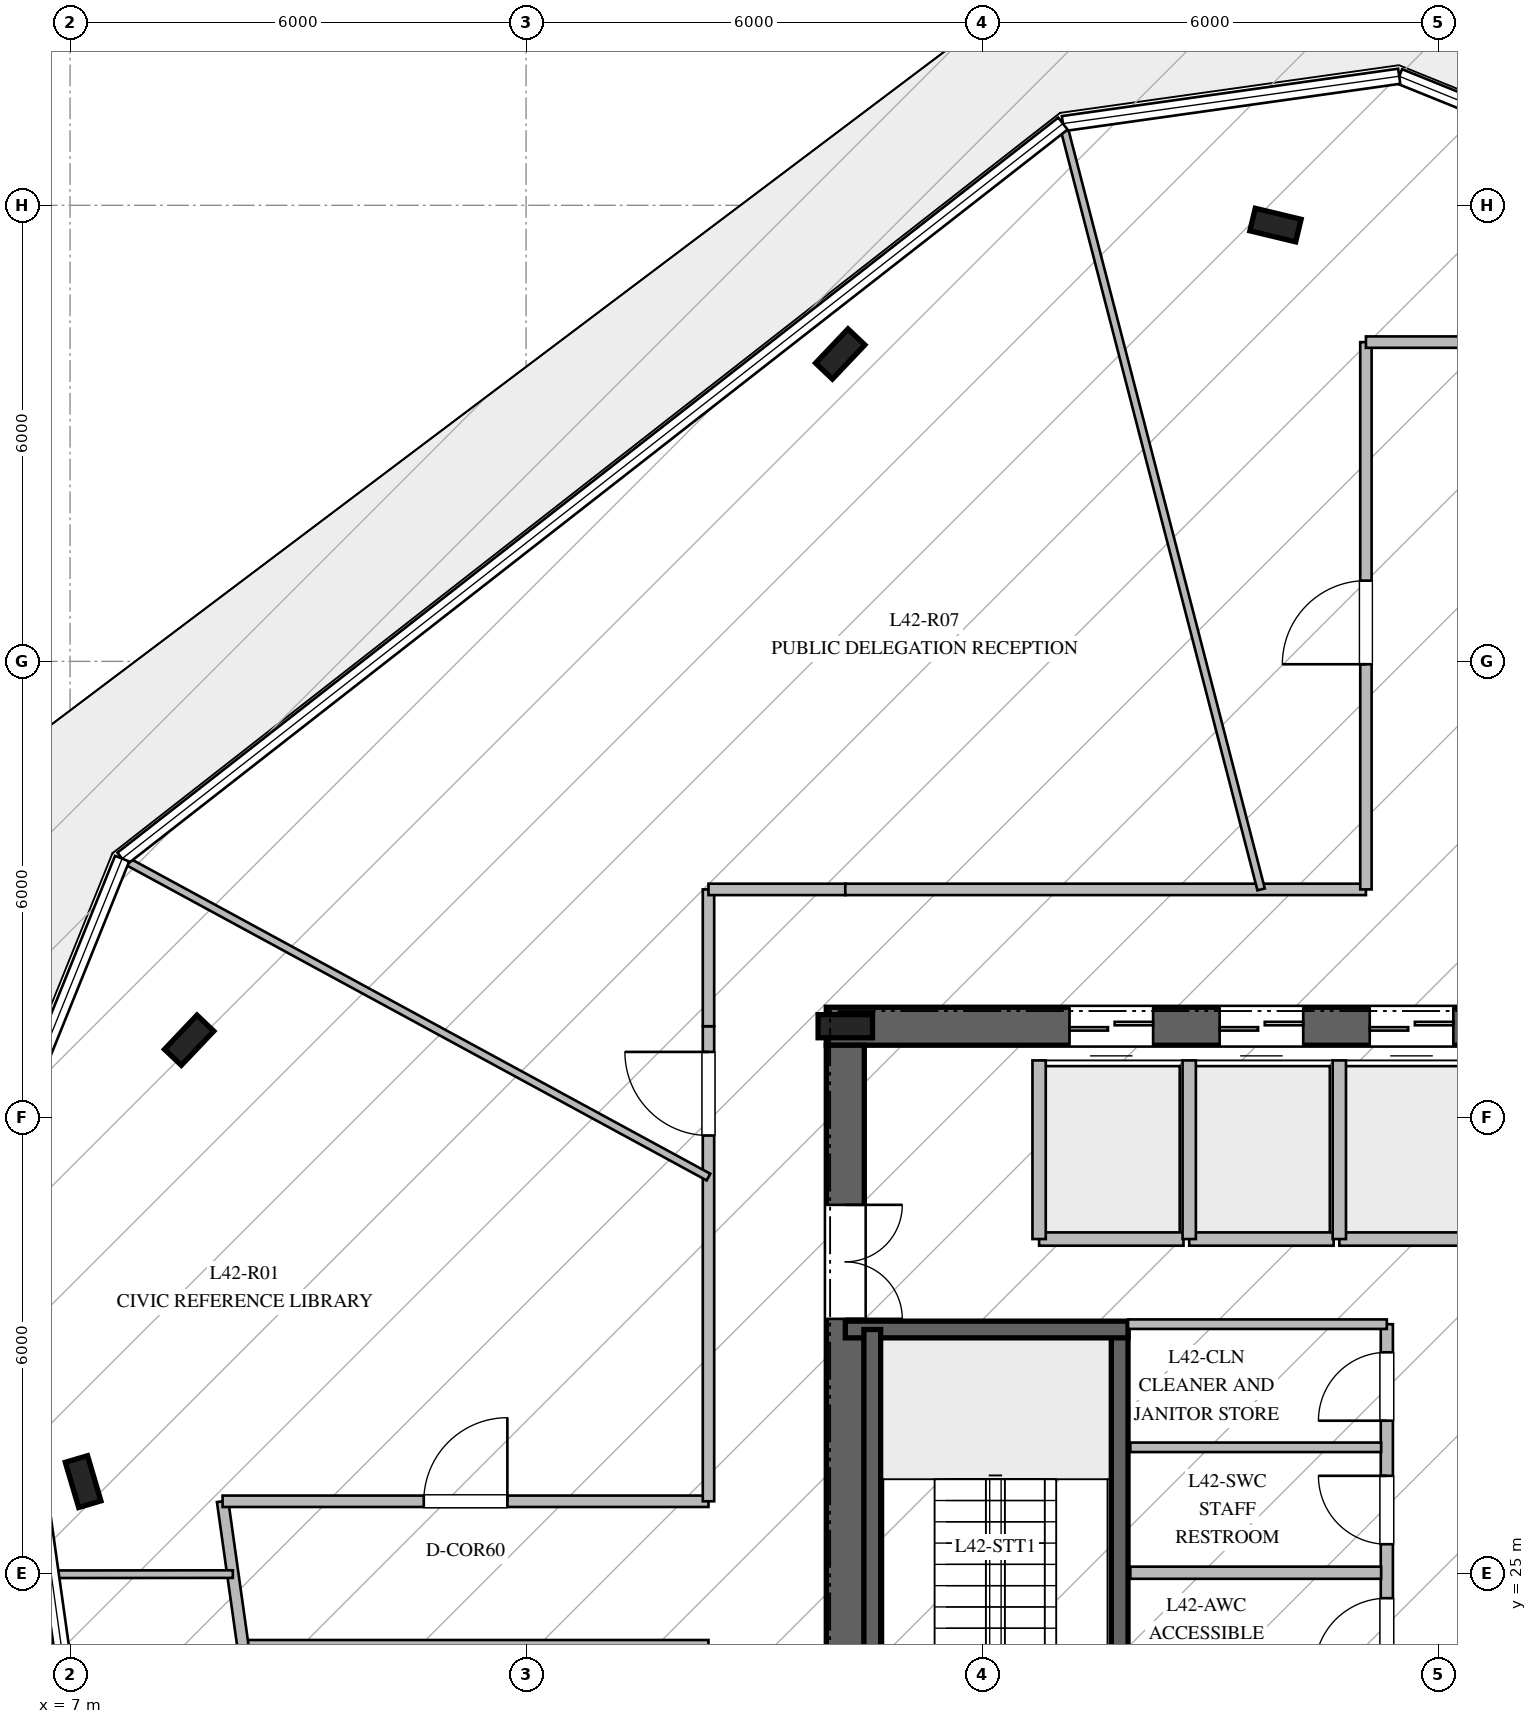
"""IFC4 building model, lengths in metres.
Left out: names, types, materials, properties, quantities, classifications, styles, units other than length and angle.
Written with IfcOpenShell. Run it as: python <this file> out.ifc"""

import sys

from ifc_helpers import new_model, si_unit, direction, frame, frame_2d, origin, origin_2d, place, context, subcontext, project, spatial, rectangle, i_section, extrude, element, fill, save


model = new_model("IFC4")
c1 = context("Model", 3, precision=1e-05, world=origin(), true_north=direction((0.0, 1.0)))
c2 = subcontext(c1, "Body", "Model", "MODEL_VIEW")
j1 = project(units=[si_unit("LENGTHUNIT", "METRE"), si_unit("PLANEANGLEUNIT", "RADIAN")], contexts=[c1])
p1 = place(None, origin())
s1 = spatial("IfcSite", under=j1, at=p1, CompositionType="ELEMENT")
p2 = place(p1, origin())
s2 = spatial("IfcBuilding", under=s1, at=p2, CompositionType="ELEMENT")
p3 = place(p2, frame((0.0, 0.0, 175.8)))
s3 = spatial("IfcBuildingStorey", under=s2, at=p3, CompositionType="ELEMENT", Elevation=175.8)
p4 = place(p3, frame((33.05, 32.2, 0.0), z_axis=(0.0, 0.0, 1.0), x_axis=(-1.0, 0.0, 0.0)))
e1 = element("IfcWall", 1, at=p4, inside=s3, PredefinedType="SHEAR", context=c2, shape_type="SweptSolid", body=[
    extrude(rectangle(XDim=16.1, YDim=0.5, at=frame_2d((8.05, 0.0))), origin(), (0.0, 0.0, 1.0), 4.78),
])
p5 = place(p4, frame((5.0, 0.0, 0.0)))
e2 = element("IfcOpeningElement", 2, at=p5, cuts=e1, PredefinedType="OPENING", context=c2, shape_type="SweptSolid", body=[
    extrude(rectangle(XDim=1.2, YDim=2.25, at=frame_2d((0.6, 1.125))), frame((0.0, 0.26, 0.0), z_axis=(0.0, -1.0, 0.0), x_axis=(1.0, 0.0, 0.0)), (0.0, 0.0, 1.0), 0.52),
])
p6 = place(p4, frame((11.8, 0.0, 0.0)))
e3 = element("IfcOpeningElement", 3, at=p6, cuts=e1, PredefinedType="OPENING", context=c2, shape_type="SweptSolid", body=[
    extrude(rectangle(XDim=1.1, YDim=2.2, at=frame_2d((0.55, 1.1))), frame((0.0, 0.26, 0.0), z_axis=(0.0, -1.0, 0.0), x_axis=(1.0, 0.0, 0.0)), (0.0, 0.0, 1.0), 0.52),
])
p7 = place(p4, frame((9.825, 0.0, 0.0)))
e4 = element("IfcOpeningElement", 4, at=p7, cuts=e1, PredefinedType="OPENING", context=c2, shape_type="SweptSolid", body=[
    extrude(rectangle(XDim=1.1, YDim=2.2, at=frame_2d((0.55, 1.1))), frame((0.0, 0.26, 0.0), z_axis=(0.0, -1.0, 0.0), x_axis=(1.0, 0.0, 0.0)), (0.0, 0.0, 1.0), 0.52),
])
p8 = place(p4, frame((7.85, 0.0, 0.0)))
e5 = element("IfcOpeningElement", 5, at=p8, cuts=e1, PredefinedType="OPENING", context=c2, shape_type="SweptSolid", body=[
    extrude(rectangle(XDim=1.1, YDim=2.2, at=frame_2d((0.55, 1.1))), frame((0.0, 0.26, 0.0), z_axis=(0.0, -1.0, 0.0), x_axis=(1.0, 0.0, 0.0)), (0.0, 0.0, 1.0), 0.52),
])
p9 = place(p3, frame((17.2, 31.95, 0.0), z_axis=(0.0, 0.0, 1.0), x_axis=(0.0, -1.0, 0.0)))
e6 = element("IfcWall", 6, at=p9, inside=s3, PredefinedType="SHEAR", context=c2, shape_type="SweptSolid", body=[
    extrude(rectangle(XDim=13.9, YDim=0.5, at=frame_2d((6.95, 0.0))), origin(), (0.0, 0.0, 1.0), 4.78),
])
p10 = place(p9, frame((2.1, 0.0, 0.0)))
e7 = element("IfcOpeningElement", 7, at=p10, cuts=e6, PredefinedType="OPENING", context=c2, shape_type="SweptSolid", body=[
    extrude(rectangle(XDim=1.5, YDim=2.2, at=frame_2d((0.75, 1.1))), frame((0.0, 0.26, 0.0), z_axis=(0.0, -1.0, 0.0), x_axis=(1.0, 0.0, 0.0)), (0.0, 0.0, 1.0), 0.52),
])
p11 = place(p3, frame((17.2, 32.2, 0.0), z_axis=(0.0, 0.0, 1.0), x_axis=(1.0, 0.0, 0.0)))
e8 = element("IfcColumn", 8, at=p11, inside=s3, PredefinedType="COLUMN", context=c2, shape_type="SweptSolid", body=[
    extrude(i_section(OverallWidth=0.304, OverallDepth=0.716, WebThickness=0.021, FlangeThickness=0.04, at=origin_2d()), origin(), (0.0, 0.0, 1.0), 5.0),
])
p12 = place(p3, frame((20.81, 20.99, 0.0), z_axis=(0.0, 0.0, 1.0), x_axis=(0.0, 1.0, 0.0)))
e9 = element("IfcWall", 9, at=p12, inside=s3, PredefinedType="SOLIDWALL", context=c2, shape_type="SweptSolid", body=[
    extrude(rectangle(XDim=7.22, YDim=0.22, at=frame_2d((3.61, 0.0))), origin(), (0.0, 0.0, 1.0), 4.78),
])
p13 = place(p12, frame((0.18, 0.0, 0.0)))
e10 = element("IfcOpeningElement", 10, at=p13, cuts=e9, PredefinedType="OPENING", context=c2, shape_type="SweptSolid", body=[
    extrude(rectangle(XDim=1.15, YDim=2.2, at=frame_2d((0.575, 1.1))), frame((0.0, 0.12, 0.0), z_axis=(0.0, -1.0, 0.0), x_axis=(1.0, 0.0, 0.0)), (0.0, 0.0, 1.0), 0.24),
])
p14 = place(p3, frame((17.2, 28.21, 0.0), z_axis=(0.0, 0.0, 1.0), x_axis=(1.0, 0.0, 0.0)))
e11 = element("IfcWall", 11, at=p14, inside=s3, PredefinedType="SOLIDWALL", context=c2, shape_type="SweptSolid", body=[
    extrude(rectangle(XDim=3.72, YDim=0.22, at=frame_2d((1.86, 0.0))), origin(), (0.0, 0.0, 1.0), 4.78),
])
p15 = place(p3, frame((17.555, 28.21, 0.0), z_axis=(0.0, 0.0, 1.0), x_axis=(0.0, -1.0, 0.0)))
e12 = element("IfcWall", 12, at=p15, inside=s3, PredefinedType="SOLIDWALL", context=c2, shape_type="SweptSolid", body=[
    extrude(rectangle(XDim=7.22, YDim=0.22, at=frame_2d((3.61, 0.0))), origin(), (0.0, 0.0, 1.0), 4.78),
])
for number, where, z_axis, x_axis in (
    (13, (22.86, 42.74, -0.27), (0.0, 0.0, 1.0), (-0.972, 0.233, 0.0)),
    (14, (17.133, 41.044, -0.27), (0.0, 0.0, 1.0), (0.688, 0.725, 0.0)),
    (15, (8.567, 32.016, -0.27), (0.0, 0.0, 1.0), (0.688, 0.725, 0.0)),
    (16, (7.172, 26.209, -0.27), (0.0, 0.0, 1.0), (-0.284, 0.959, 0.0)),
):
    element("IfcColumn", number, at=place(p3, frame(where, z_axis=z_axis, x_axis=x_axis)), inside=s3, PredefinedType="COLUMN", context=c2, shape_type="SweptSolid", body=[
        extrude(i_section(OverallWidth=0.305, OverallDepth=0.62, WebThickness=0.021, FlangeThickness=0.04, at=origin_2d()), origin(), (0.0, 0.0, 1.0), 5.27),
    ])
p16 = place(p3, frame((24.325, 23.35, 0.0), z_axis=(0.0, 0.0, 1.0), x_axis=(0.0, 1.0, 0.0)))
e17 = element("IfcWall", 17, at=p16, inside=s3, PredefinedType="PLUMBINGWALL", context=c2, shape_type="SweptSolid", body=[
    extrude(rectangle(XDim=4.93, YDim=0.16, at=frame_2d((2.465, 0.0))), origin(), (0.0, 0.0, 1.0), 4.78),
])
p17 = place(p16, frame((0.375, 0.0, 0.0)))
e18 = element("IfcOpeningElement", 18, at=p17, cuts=e17, PredefinedType="OPENING", context=c2, shape_type="SweptSolid", body=[
    extrude(rectangle(XDim=0.95, YDim=2.1, at=frame_2d((0.475, 1.05))), frame((0.0, 0.09, 0.0), z_axis=(0.0, -1.0, 0.0), x_axis=(1.0, 0.0, 0.0)), (0.0, 0.0, 1.0), 0.18),
])
p18 = place(p16, frame((2.035, 0.0, 0.0)))
e19 = element("IfcOpeningElement", 19, at=p18, cuts=e17, PredefinedType="OPENING", context=c2, shape_type="SweptSolid", body=[
    extrude(rectangle(XDim=0.9, YDim=2.1, at=frame_2d((0.45, 1.05))), frame((0.0, 0.09, 0.0), z_axis=(0.0, -1.0, 0.0), x_axis=(1.0, 0.0, 0.0)), (0.0, 0.0, 1.0), 0.18),
])
p19 = place(p16, frame((3.66, 0.0, 0.0)))
e20 = element("IfcOpeningElement", 20, at=p19, cuts=e17, PredefinedType="OPENING", context=c2, shape_type="SweptSolid", body=[
    extrude(rectangle(XDim=0.9, YDim=2.1, at=frame_2d((0.45, 1.05))), frame((0.0, 0.09, 0.0), z_axis=(0.0, -1.0, 0.0), x_axis=(1.0, 0.0, 0.0)), (0.0, 0.0, 1.0), 0.18),
])
p20 = place(p3, frame((20.92, 28.28, 0.0), z_axis=(0.0, 0.0, 1.0), x_axis=(1.0, 0.0, 0.0)))
e21 = element("IfcWall", 21, at=p20, inside=s3, PredefinedType="PARTITIONING", context=c2, shape_type="SweptSolid", body=[
    extrude(rectangle(XDim=3.405, YDim=0.125, at=frame_2d((1.703, 0.0))), origin(), (0.0, 0.0, 1.0), 4.78),
])
p21 = place(p3, frame((20.95, 25.01, 0.0), z_axis=(0.0, 0.0, 1.0), x_axis=(1.0, 0.0, 0.0)))
e22 = element("IfcWall", 22, at=p21, inside=s3, PredefinedType="PLUMBINGWALL", context=c2, shape_type="SweptSolid", body=[
    extrude(rectangle(XDim=3.3, YDim=0.16, at=frame_2d((1.65, 0.0))), origin(), (0.0, 0.0, 1.0), 4.78),
])
p22 = place(p3, frame((20.95, 26.66, 0.0), z_axis=(0.0, 0.0, 1.0), x_axis=(1.0, 0.0, 0.0)))
e23 = element("IfcWall", 23, at=p22, inside=s3, PredefinedType="PARTITIONING", context=c2, shape_type="SweptSolid", body=[
    extrude(rectangle(XDim=3.3, YDim=0.125, at=frame_2d((1.65, 0.0))), origin(), (0.0, 0.0, 1.0), 4.78),
])
p23 = place(p3, frame((19.75, 29.4, 0.0), z_axis=(0.0, 0.0, 1.0), x_axis=(1.0, 0.0, 0.0)))
e24 = element("IfcWall", 24, at=p23, inside=s3, PredefinedType="PARTITIONING", context=c2, shape_type="SweptSolid", body=[
    extrude(rectangle(XDim=1.9, YDim=0.175, at=frame_2d((0.95, 0.0))), origin(), (0.0, 0.0, 1.0), 4.78),
])
p24 = place(p3, frame((19.75, 29.4, 0.0), z_axis=(0.0, 0.0, 1.0), x_axis=(0.0, 1.0, 0.0)))
e25 = element("IfcWall", 25, at=p24, inside=s3, PredefinedType="PARTITIONING", context=c2, shape_type="SweptSolid", body=[
    extrude(rectangle(XDim=2.35, YDim=0.175, at=frame_2d((1.175, 0.0))), origin(), (0.0, 0.0, 1.0), 4.78),
])
p25 = place(p3, frame((21.725, 29.4, 0.0), z_axis=(0.0, 0.0, 1.0), x_axis=(1.0, 0.0, 0.0)))
e26 = element("IfcWall", 26, at=p25, inside=s3, PredefinedType="PARTITIONING", context=c2, shape_type="SweptSolid", body=[
    extrude(rectangle(XDim=1.9, YDim=0.175, at=frame_2d((0.95, 0.0))), origin(), (0.0, 0.0, 1.0), 4.78),
])
p26 = place(p3, frame((21.725, 29.4, 0.0), z_axis=(0.0, 0.0, 1.0), x_axis=(0.0, 1.0, 0.0)))
e27 = element("IfcWall", 27, at=p26, inside=s3, PredefinedType="PARTITIONING", context=c2, shape_type="SweptSolid", body=[
    extrude(rectangle(XDim=2.35, YDim=0.175, at=frame_2d((1.175, 0.0))), origin(), (0.0, 0.0, 1.0), 4.78),
])
p27 = place(p3, frame((23.7, 29.4, 0.0), z_axis=(0.0, 0.0, 1.0), x_axis=(1.0, 0.0, 0.0)))
e28 = element("IfcWall", 28, at=p27, inside=s3, PredefinedType="PARTITIONING", context=c2, shape_type="SweptSolid", body=[
    extrude(rectangle(XDim=1.9, YDim=0.175, at=frame_2d((0.95, 0.0))), origin(), (0.0, 0.0, 1.0), 4.78),
])
p28 = place(p3, frame((23.7, 29.4, 0.0), z_axis=(0.0, 0.0, 1.0), x_axis=(0.0, 1.0, 0.0)))
e29 = element("IfcWall", 29, at=p28, inside=s3, PredefinedType="PARTITIONING", context=c2, shape_type="SweptSolid", body=[
    extrude(rectangle(XDim=2.35, YDim=0.175, at=frame_2d((1.175, 0.0))), origin(), (0.0, 0.0, 1.0), 4.78),
])
p29 = place(p3, frame((15.4, 24.05, 0.0), z_axis=(0.0, 0.0, 1.0), x_axis=(-1.0, 0.0, 0.0)))
e30 = element("IfcWall", 30, at=p29, inside=s3, PredefinedType="PARTITIONING", context=c2, shape_type="SweptSolid", body=[
    extrude(rectangle(XDim=6.126, YDim=0.15, at=frame_2d((3.063, 0.0))), origin(), (0.0, 0.0, 1.0), 4.42),
])
p30 = place(p3, frame((9.274, 24.05, 0.0), z_axis=(0.0, 0.0, 1.0), x_axis=(-0.139087149584, 0.990280144616, 0.0)))
e31 = element("IfcWall", 31, at=p30, inside=s3, PredefinedType="PARTITIONING", context=c2, shape_type="SweptSolid", body=[
    extrude(rectangle(XDim=1.918, YDim=0.15, at=frame_2d((0.959, 0.0))), origin(), (0.0, 0.0, 1.0), 4.78),
])
p31 = place(p3, frame((9.007, 25.95, 0.0), z_axis=(0.0, 0.0, 1.0), x_axis=(1.0, 0.0, 0.0)))
e32 = element("IfcWall", 32, at=p31, inside=s3, PredefinedType="PARTITIONING", context=c2, shape_type="SweptSolid", body=[
    extrude(rectangle(XDim=6.393, YDim=0.15, at=frame_2d((3.196, 0.0))), origin(), (0.0, 0.0, 1.0), 4.42),
])
p32 = place(p31, frame((2.647, 0.0, 0.0)))
e33 = element("IfcOpeningElement", 33, at=p32, cuts=e32, PredefinedType="OPENING", context=c2, shape_type="SweptSolid", body=[
    extrude(rectangle(XDim=1.1, YDim=2.2, at=frame_2d((0.55, 1.1))), frame((0.0, 0.085, 0.0), z_axis=(0.0, -1.0, 0.0), x_axis=(1.0, 0.0, 0.0)), (0.0, 0.0, 1.0), 0.17),
])
p33 = place(p3, frame((15.4, 25.95, 0.0), z_axis=(0.0, 0.0, 1.0), x_axis=(0.0, 1.0, 0.0)))
e34 = element("IfcWall", 34, at=p33, inside=s3, PredefinedType="PARTITIONING", context=c2, shape_type="SweptSolid", body=[
    extrude(rectangle(XDim=6.25, YDim=0.15, at=frame_2d((3.125, 0.0))), origin(), (0.0, 0.0, 1.0), 4.28),
])
p34 = place(p33, frame((4.812, 0.0, 0.0)))
e35 = element("IfcOpeningElement", 35, at=p34, cuts=e34, PredefinedType="OPENING", context=c2, shape_type="SweptSolid", body=[
    extrude(rectangle(XDim=1.1, YDim=2.2, at=frame_2d((0.55, 1.1))), frame((0.0, 0.085, 0.0), z_axis=(0.0, -1.0, 0.0), x_axis=(1.0, 0.0, 0.0)), (0.0, 0.0, 1.0), 0.17),
])
for number, where, z_axis, x_axis in (
    (36, (15.4, 32.2, 0.0), (0.0, 0.0, 1.0), (0.0, 1.0, 0.0)),
    (37, (15.4, 34.0, 0.0), (0.0, 0.0, 1.0), (1.0, 0.0, 0.0)),
):
    element("IfcWall", number, at=place(p3, frame(where, z_axis=z_axis, x_axis=x_axis)), inside=s3, PredefinedType="PARTITIONING", context=c2, shape_type="SweptSolid", body=[
        extrude(rectangle(XDim=1.8, YDim=0.15, at=frame_2d((0.9, 0.0))), origin(), (0.0, 0.0, 1.0), 4.28),
    ])
p35 = place(p3, frame((17.2, 34.0, 0.0), z_axis=(0.0, 0.0, 1.0), x_axis=(1.0, 0.0, 0.0)))
e38 = element("IfcWall", 38, at=p35, inside=s3, PredefinedType="PARTITIONING", context=c2, shape_type="SweptSolid", body=[
    extrude(rectangle(XDim=6.85, YDim=0.15, at=frame_2d((3.425, 0.0))), origin(), (0.0, 0.0, 1.0), 4.28),
])
p36 = place(p3, frame((24.05, 34.0, 0.0), z_axis=(0.0, 0.0, 1.0), x_axis=(0.0, 1.0, 0.0)))
e39 = element("IfcWall", 39, at=p36, inside=s3, PredefinedType="PARTITIONING", context=c2, shape_type="SweptSolid", body=[
    extrude(rectangle(XDim=7.2, YDim=0.15, at=frame_2d((3.6, 0.0))), origin(), (0.0, 0.0, 1.0), 4.05),
])
p37 = place(p36, frame((2.962, 0.0, 0.0)))
e40 = element("IfcOpeningElement", 40, at=p37, cuts=e39, PredefinedType="OPENING", context=c2, shape_type="SweptSolid", body=[
    extrude(rectangle(XDim=1.1, YDim=2.2, at=frame_2d((0.55, 1.1))), frame((0.0, 0.085, 0.0), z_axis=(0.0, -1.0, 0.0), x_axis=(1.0, 0.0, 0.0)), (0.0, 0.0, 1.0), 0.17),
])
p38 = place(p3, frame((24.05, 41.2, 0.0), z_axis=(0.0, 0.0, 1.0), x_axis=(1.0, 0.0, 0.0)))
e41 = element("IfcWall", 41, at=p38, inside=s3, PredefinedType="PARTITIONING", context=c2, shape_type="SweptSolid", body=[
    extrude(rectangle(XDim=1.9, YDim=0.15, at=frame_2d((0.95, 0.0))), origin(), (0.0, 0.0, 1.0), 4.78),
])
p39 = place(p3, frame((22.671, 34.0, 0.0), z_axis=(0.0, 0.0, 1.0), x_axis=(-0.250522569183, 0.96811075933, 0.0)))
e42 = element("IfcWall", 42, at=p39, inside=s3, PredefinedType="MOVABLE", context=c2, shape_type="SweptSolid", body=[
    extrude(rectangle(XDim=10.389, YDim=0.1, at=frame_2d((5.195, 0.0))), origin(), (0.0, 0.0, 1.0), 4.05),
])
p40 = place(p3, frame((15.4, 30.215, 0.0), z_axis=(0.0, 0.0, 1.0), x_axis=(-0.878736567254, 0.477307076597, 0.0)))
e43 = element("IfcWall", 43, at=p40, inside=s3, PredefinedType="MOVABLE", context=c2, shape_type="SweptSolid", body=[
    extrude(rectangle(XDim=8.761, YDim=0.1, at=frame_2d((4.381, 0.0))), origin(), (0.0, 0.0, 1.0), 4.18),
])
p41 = place(p3, frame((9.142, 24.992, 0.0), z_axis=(0.0, 0.0, 1.0), x_axis=(-0.999999661298, -0.000823044989, 0.0)))
e44 = element("IfcWall", 44, at=p41, inside=s3, PredefinedType="MOVABLE", context=c2, shape_type="SweptSolid", body=[
    extrude(rectangle(XDim=2.373, YDim=0.1, at=frame_2d((1.187, 0.0))), origin(), (0.0, 0.0, 1.0), 4.18),
])
p42 = place(p10, origin())
e45 = element("IfcDoor", 45, at=p42, inside=s3, OperationType="DOUBLE_DOOR_SINGLE_SWING", PredefinedType="DOOR", context=c2, shape_type="SweptSolid", body=[
    extrude(rectangle(XDim=1.5, YDim=2.2, at=frame_2d((0.75, 1.1))), frame((0.0, 0.025, 0.0), z_axis=(0.0, -1.0, 0.0), x_axis=(1.0, 0.0, 0.0)), (0.0, 0.0, 1.0), 0.05),
])
fill(e7, e45)
p43 = place(p17, origin())
e46 = element("IfcDoor", 46, at=p43, inside=s3, OperationType="SINGLE_SWING_LEFT", PredefinedType="DOOR", context=c2, shape_type="SweptSolid", body=[
    extrude(rectangle(XDim=0.95, YDim=2.1, at=frame_2d((0.475, 1.05))), frame((0.0, 0.025, 0.0), z_axis=(0.0, -1.0, 0.0), x_axis=(1.0, 0.0, 0.0)), (0.0, 0.0, 1.0), 0.05),
])
fill(e18, e46)
p44 = place(p18, origin())
e47 = element("IfcDoor", 47, at=p44, inside=s3, OperationType="SINGLE_SWING_RIGHT", PredefinedType="DOOR", context=c2, shape_type="SweptSolid", body=[
    extrude(rectangle(XDim=0.9, YDim=2.1, at=frame_2d((0.45, 1.05))), frame((0.0, 0.025, 0.0), z_axis=(0.0, -1.0, 0.0), x_axis=(1.0, 0.0, 0.0)), (0.0, 0.0, 1.0), 0.05),
])
fill(e19, e47)
p45 = place(p19, origin())
e48 = element("IfcDoor", 48, at=p45, inside=s3, OperationType="SINGLE_SWING_LEFT", PredefinedType="DOOR", context=c2, shape_type="SweptSolid", body=[
    extrude(rectangle(XDim=0.9, YDim=2.1, at=frame_2d((0.45, 1.05))), frame((0.0, 0.025, 0.0), z_axis=(0.0, -1.0, 0.0), x_axis=(1.0, 0.0, 0.0)), (0.0, 0.0, 1.0), 0.05),
])
fill(e20, e48)
p46 = place(p6, origin())
e49 = element("IfcDoor", 49, at=p46, inside=s3, OperationType="DOUBLE_DOOR_SLIDING", PredefinedType="DOOR", context=c2, shape_type="SweptSolid", body=[
    extrude(rectangle(XDim=1.1, YDim=2.2, at=frame_2d((0.55, 1.1))), frame((0.0, 0.025, 0.0), z_axis=(0.0, -1.0, 0.0), x_axis=(1.0, 0.0, 0.0)), (0.0, 0.0, 1.0), 0.05),
])
fill(e3, e49)
p47 = place(p7, origin())
e50 = element("IfcDoor", 50, at=p47, inside=s3, OperationType="DOUBLE_DOOR_SLIDING", PredefinedType="DOOR", context=c2, shape_type="SweptSolid", body=[
    extrude(rectangle(XDim=1.1, YDim=2.2, at=frame_2d((0.55, 1.1))), frame((0.0, 0.025, 0.0), z_axis=(0.0, -1.0, 0.0), x_axis=(1.0, 0.0, 0.0)), (0.0, 0.0, 1.0), 0.05),
])
fill(e4, e50)
p48 = place(p8, origin())
e51 = element("IfcDoor", 51, at=p48, inside=s3, OperationType="DOUBLE_DOOR_SLIDING", PredefinedType="DOOR", context=c2, shape_type="SweptSolid", body=[
    extrude(rectangle(XDim=1.1, YDim=2.2, at=frame_2d((0.55, 1.1))), frame((0.0, 0.025, 0.0), z_axis=(0.0, -1.0, 0.0), x_axis=(1.0, 0.0, 0.0)), (0.0, 0.0, 1.0), 0.05),
])
fill(e5, e51)
p49 = place(p32, origin())
e52 = element("IfcDoor", 52, at=p49, inside=s3, OperationType="SINGLE_SWING_RIGHT", PredefinedType="DOOR", context=c2, shape_type="SweptSolid", body=[
    extrude(rectangle(XDim=1.1, YDim=2.2, at=frame_2d((0.55, 1.1))), frame((0.0, 0.025, 0.0), z_axis=(0.0, -1.0, 0.0), x_axis=(1.0, 0.0, 0.0)), (0.0, 0.0, 1.0), 0.05),
])
fill(e33, e52)
p50 = place(p37, origin())
e53 = element("IfcDoor", 53, at=p50, inside=s3, OperationType="SINGLE_SWING_LEFT", PredefinedType="DOOR", context=c2, shape_type="SweptSolid", body=[
    extrude(rectangle(XDim=1.1, YDim=2.2, at=frame_2d((0.55, 1.1))), frame((0.0, 0.025, 0.0), z_axis=(0.0, -1.0, 0.0), x_axis=(1.0, 0.0, 0.0)), (0.0, 0.0, 1.0), 0.05),
])
fill(e40, e53)
p51 = place(p34, origin())
e54 = element("IfcDoor", 54, at=p51, inside=s3, OperationType="SINGLE_SWING_RIGHT", PredefinedType="DOOR", context=c2, shape_type="SweptSolid", body=[
    extrude(rectangle(XDim=1.1, YDim=2.2, at=frame_2d((0.55, 1.1))), frame((0.0, 0.025, 0.0), z_axis=(0.0, -1.0, 0.0), x_axis=(1.0, 0.0, 0.0)), (0.0, 0.0, 1.0), 0.05),
])
fill(e35, e54)
save(model, sys.argv[1])
